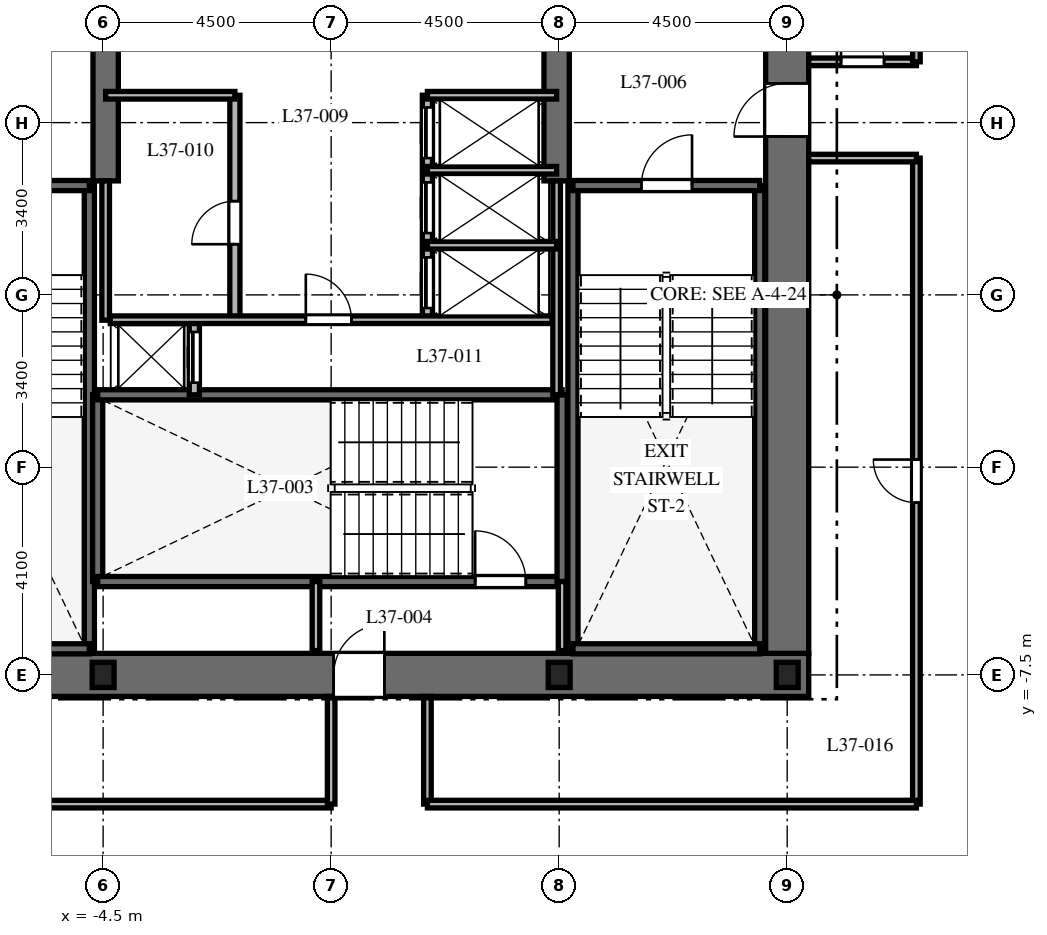
"""IFC4 building model, lengths in metres.
Left out: names, types, materials, properties, quantities, classifications, styles, units other than length and angle.
Written with IfcOpenShell. Run it as: python <this file> out.ifc"""

import sys

from ifc_helpers import new_model, si_unit, direction, frame, frame_2d, origin, origin_2d, place, context, subcontext, project, spatial, rectangle, i_section, extrude, element, fill, save


model = new_model("IFC4")
c1 = context("Model", 3, precision=1e-05, world=origin(), true_north=direction((0.0, 1.0)))
c2 = subcontext(c1, "Body", "Model", "MODEL_VIEW")
j1 = project(units=[si_unit("LENGTHUNIT", "METRE"), si_unit("PLANEANGLEUNIT", "RADIAN")], contexts=[c1])
p1 = place(None, origin())
s1 = spatial("IfcSite", under=j1, at=p1, CompositionType="ELEMENT")
p2 = place(p1, origin())
s2 = spatial("IfcBuilding", under=s1, at=p2, CompositionType="ELEMENT")
p3 = place(p2, frame((0.0, 0.0, 151.7)))
s3 = spatial("IfcBuildingStorey", under=s2, at=p3, CompositionType="ELEMENT", Elevation=151.7)
p4 = place(p3, frame((-9.425, -7.5, 0.0), z_axis=(0.0, 0.0, 1.0), x_axis=(1.0, 0.0, 0.0)))
e1 = element("IfcWall", 1, at=p4, inside=s3, PredefinedType="SHEAR", context=c2, shape_type="SweptSolid", body=[
    extrude(rectangle(XDim=18.85, YDim=0.85, at=frame_2d((9.425, 0.0))), origin(), (0.0, 0.0, 1.0), 3.7),
])
p5 = place(p4, frame((9.475, 0.0, 0.0)))
e2 = element("IfcOpeningElement", 2, at=p5, cuts=e1, PredefinedType="OPENING", context=c2, shape_type="SweptSolid", body=[
    extrude(rectangle(XDim=1.0, YDim=2.15, at=frame_2d((0.5, 1.075))), frame((0.0, 0.435, 0.0), z_axis=(0.0, -1.0, 0.0), x_axis=(1.0, 0.0, 0.0)), (0.0, 0.0, 1.0), 0.87),
])
p6 = place(p3, frame((9.0, -7.075, 0.0), z_axis=(0.0, 0.0, 1.0), x_axis=(0.0, 1.0, 0.0)))
e3 = element("IfcWall", 3, at=p6, inside=s3, PredefinedType="SHEAR", context=c2, shape_type="SweptSolid", body=[
    extrude(rectangle(XDim=14.15, YDim=0.85, at=frame_2d((7.075, 0.0))), origin(), (0.0, 0.0, 1.0), 3.7),
])
p7 = place(p6, frame((10.2, 0.0, 0.0)))
e4 = element("IfcOpeningElement", 4, at=p7, cuts=e3, PredefinedType="OPENING", context=c2, shape_type="SweptSolid", body=[
    extrude(rectangle(XDim=1.05, YDim=2.15, at=frame_2d((0.525, 1.075))), frame((0.0, 0.435, 0.0), z_axis=(0.0, -1.0, 0.0), x_axis=(1.0, 0.0, 0.0)), (0.0, 0.0, 1.0), 0.87),
])
for number, where, z_axis, x_axis in (
    (5, (-4.45, 2.25, 0.0), (0.0, 0.0, 1.0), (0.0, 1.0, 0.0)),
    (6, (4.45, 2.25, 0.0), (0.0, 0.0, 1.0), (0.0, 1.0, 0.0)),
):
    element("IfcWall", number, at=place(p3, frame(where, z_axis=z_axis, x_axis=x_axis)), inside=s3, PredefinedType="SHEAR", context=c2, shape_type="SweptSolid", body=[
        extrude(rectangle(XDim=4.825, YDim=0.5, at=frame_2d((2.413, 0.0))), origin(), (0.0, 0.0, 1.0), 3.7),
    ])
p8 = place(p3, frame((-4.772, -6.985, 0.0), z_axis=(0.0, 0.0, 1.0), x_axis=(0.0, 1.0, 0.0)))
e7 = element("IfcWall", 7, at=p8, inside=s3, PredefinedType="SHEAR", context=c2, shape_type="SweptSolid", body=[
    extrude(rectangle(XDim=9.143, YDim=0.2, at=frame_2d((4.572, 0.0))), origin(), (0.0, 0.0, 1.0), 3.7),
])
p9 = place(p3, frame((-8.458, -6.985, 0.0), z_axis=(0.0, 0.0, 1.0), x_axis=(1.0, 0.0, 0.0)))
e8 = element("IfcWall", 8, at=p9, inside=s3, PredefinedType="SHEAR", context=c2, shape_type="SweptSolid", body=[
    extrude(rectangle(XDim=3.686, YDim=0.2, at=frame_2d((1.843, 0.0))), origin(), (0.0, 0.0, 1.0), 3.7),
])
p10 = place(p3, frame((-8.458, 2.158, 0.0), z_axis=(0.0, 0.0, 1.0), x_axis=(1.0, 0.0, 0.0)))
e9 = element("IfcWall", 9, at=p10, inside=s3, PredefinedType="SHEAR", context=c2, shape_type="SweptSolid", body=[
    extrude(rectangle(XDim=3.686, YDim=0.2, at=frame_2d((1.843, 0.0))), origin(), (0.0, 0.0, 1.0), 3.7),
])
p11 = place(p10, frame((1.3, 0.0, 0.0)))
e10 = element("IfcOpeningElement", 10, at=p11, cuts=e9, PredefinedType="OPENING", context=c2, shape_type="SweptSolid", body=[
    extrude(rectangle(XDim=1.0, YDim=2.15, at=frame_2d((0.5, 1.075))), frame((0.0, 0.11, 0.0), z_axis=(0.0, -1.0, 0.0), x_axis=(1.0, 0.0, 0.0)), (0.0, 0.0, 1.0), 0.22),
])
for number, where, z_axis, x_axis in (
    (11, (4.772, -6.985, 0.0), (0.0, 0.0, 1.0), (0.0, 1.0, 0.0)),
    (12, (8.458, -6.985, 0.0), (0.0, 0.0, 1.0), (0.0, 1.0, 0.0)),
):
    element("IfcWall", number, at=place(p3, frame(where, z_axis=z_axis, x_axis=x_axis)), inside=s3, PredefinedType="SHEAR", context=c2, shape_type="SweptSolid", body=[
        extrude(rectangle(XDim=9.143, YDim=0.2, at=frame_2d((4.572, 0.0))), origin(), (0.0, 0.0, 1.0), 3.7),
    ])
p12 = place(p3, frame((4.772, -6.985, 0.0), z_axis=(0.0, 0.0, 1.0), x_axis=(1.0, 0.0, 0.0)))
e13 = element("IfcWall", 13, at=p12, inside=s3, PredefinedType="SHEAR", context=c2, shape_type="SweptSolid", body=[
    extrude(rectangle(XDim=3.686, YDim=0.2, at=frame_2d((1.843, 0.0))), origin(), (0.0, 0.0, 1.0), 3.7),
])
p13 = place(p3, frame((4.772, 2.158, 0.0), z_axis=(0.0, 0.0, 1.0), x_axis=(1.0, 0.0, 0.0)))
e14 = element("IfcWall", 14, at=p13, inside=s3, PredefinedType="SHEAR", context=c2, shape_type="SweptSolid", body=[
    extrude(rectangle(XDim=3.686, YDim=0.2, at=frame_2d((1.843, 0.0))), origin(), (0.0, 0.0, 1.0), 3.7),
])
p14 = place(p13, frame((1.35, 0.0, 0.0)))
e15 = element("IfcOpeningElement", 15, at=p14, cuts=e14, PredefinedType="OPENING", context=c2, shape_type="SweptSolid", body=[
    extrude(rectangle(XDim=1.0, YDim=2.15, at=frame_2d((0.5, 1.075))), frame((0.0, 0.11, 0.0), z_axis=(0.0, -1.0, 0.0), x_axis=(1.0, 0.0, 0.0)), (0.0, 0.0, 1.0), 0.22),
])
p15 = place(p3, frame((-4.608, -5.658, 0.0), z_axis=(0.0, 0.0, 1.0), x_axis=(0.0, 1.0, 0.0)))
e16 = element("IfcWall", 16, at=p15, inside=s3, PredefinedType="SHEAR", context=c2, shape_type="SweptSolid", body=[
    extrude(rectangle(XDim=3.686, YDim=0.2, at=frame_2d((1.843, 0.0))), origin(), (0.0, 0.0, 1.0), 3.7),
])
p16 = place(p3, frame((-4.608, -5.658, 0.0), z_axis=(0.0, 0.0, 1.0), x_axis=(1.0, 0.0, 0.0)))
e17 = element("IfcWall", 17, at=p16, inside=s3, PredefinedType="SHEAR", context=c2, shape_type="SweptSolid", body=[
    extrude(rectangle(XDim=9.166, YDim=0.2, at=frame_2d((4.583, 0.0))), origin(), (0.0, 0.0, 1.0), 3.7),
])
p17 = place(p16, frame((7.45, 0.0, 0.0)))
e18 = element("IfcOpeningElement", 18, at=p17, cuts=e17, PredefinedType="OPENING", context=c2, shape_type="SweptSolid", body=[
    extrude(rectangle(XDim=1.0, YDim=2.15, at=frame_2d((0.5, 1.075))), frame((0.0, 0.11, 0.0), z_axis=(0.0, -1.0, 0.0), x_axis=(1.0, 0.0, 0.0)), (0.0, 0.0, 1.0), 0.22),
])
p18 = place(p3, frame((-4.608, -1.972, 0.0), z_axis=(0.0, 0.0, 1.0), x_axis=(1.0, 0.0, 0.0)))
e19 = element("IfcWall", 19, at=p18, inside=s3, PredefinedType="SHEAR", context=c2, shape_type="SweptSolid", body=[
    extrude(rectangle(XDim=9.166, YDim=0.2, at=frame_2d((4.583, 0.0))), origin(), (0.0, 0.0, 1.0), 3.7),
])
p19 = place(p3, frame((4.558, -5.658, 0.0), z_axis=(0.0, 0.0, 1.0), x_axis=(0.0, 1.0, 0.0)))
e20 = element("IfcWall", 20, at=p19, inside=s3, PredefinedType="SHEAR", context=c2, shape_type="SweptSolid", body=[
    extrude(rectangle(XDim=3.686, YDim=0.2, at=frame_2d((1.843, 0.0))), origin(), (0.0, 0.0, 1.0), 3.7),
])
for number, where, z_axis, x_axis in (
    (21, (-4.5, -7.5, 0.0), (0.0, 0.0, 1.0), (1.0, 0.0, 0.0)),
    (22, (4.5, -7.5, 0.0), (0.0, 0.0, 1.0), (1.0, 0.0, 0.0)),
    (23, (9.0, -7.5, 0.0), (0.0, 0.0, 1.0), (1.0, 0.0, 0.0)),
):
    element("IfcColumn", number, at=place(p3, frame(where, z_axis=z_axis, x_axis=x_axis)), inside=s3, PredefinedType="COLUMN", context=c2, shape_type="SweptSolid", body=[
        extrude(i_section(OverallWidth=0.432, OverallDepth=0.498, WebThickness=0.056, FlangeThickness=0.089, at=origin_2d()), origin(), (0.0, 0.0, 1.0), 3.7),
    ])
for number, where, z_axis, x_axis in (
    (24, (-0.3, -7.02, 0.0), (0.0, 0.0, 1.0), (0.0, 1.0, 0.0)),
    (25, (4.558, -7.02, 0.0), (0.0, 0.0, 1.0), (0.0, 1.0, 0.0)),
):
    element("IfcWall", number, at=place(p3, frame(where, z_axis=z_axis, x_axis=x_axis)), inside=s3, PredefinedType="PARTITIONING", context=c2, shape_type="SweptSolid", body=[
        extrude(rectangle(XDim=1.362, YDim=0.15, at=frame_2d((0.681, 0.0))), origin(), (0.0, 0.0, 1.0), 3.4),
    ])
p20 = place(p3, frame((-2.7, -1.972, 0.0), z_axis=(0.0, 0.0, 1.0), x_axis=(0.0, 1.0, 0.0)))
e26 = element("IfcWall", 26, at=p20, inside=s3, PredefinedType="PARTITIONING", context=c2, shape_type="SweptSolid", body=[
    extrude(rectangle(XDim=1.472, YDim=0.2, at=frame_2d((0.736, 0.0))), origin(), (0.0, 0.0, 1.0), 3.4),
])
p21 = place(p20, frame((0.24, 0.0, 0.0)))
e27 = element("IfcOpeningElement", 27, at=p21, cuts=e26, PredefinedType="OPENING", context=c2, shape_type="SweptSolid", body=[
    extrude(rectangle(XDim=1.0, YDim=2.2, at=frame_2d((0.5, 1.1))), frame((0.0, 0.11, 0.0), z_axis=(0.0, -1.0, 0.0), x_axis=(1.0, 0.0, 0.0)), (0.0, 0.0, 1.0), 0.22),
])
p22 = place(p3, frame((-4.45, -0.5, 0.0), z_axis=(0.0, 0.0, 1.0), x_axis=(0.0, 1.0, 0.0)))
e28 = element("IfcWall", 28, at=p22, inside=s3, PredefinedType="PARTITIONING", context=c2, shape_type="SweptSolid", body=[
    extrude(rectangle(XDim=2.75, YDim=0.15, at=frame_2d((1.375, 0.0))), origin(), (0.0, 0.0, 1.0), 3.4),
])
p23 = place(p3, frame((4.45, -1.972, 0.0), z_axis=(0.0, 0.0, 1.0), x_axis=(0.0, 1.0, 0.0)))
e29 = element("IfcWall", 29, at=p23, inside=s3, PredefinedType="PARTITIONING", context=c2, shape_type="SweptSolid", body=[
    extrude(rectangle(XDim=4.222, YDim=0.15, at=frame_2d((2.111, 0.0))), origin(), (0.0, 0.0, 1.0), 3.4),
])
p24 = place(p3, frame((-1.9, -0.5, 0.0), z_axis=(0.0, 0.0, 1.0), x_axis=(0.0, 1.0, 0.0)))
e30 = element("IfcWall", 30, at=p24, inside=s3, PredefinedType="PARTITIONING", context=c2, shape_type="SweptSolid", body=[
    extrude(rectangle(XDim=4.44, YDim=0.2, at=frame_2d((2.22, 0.0))), origin(), (0.0, 0.0, 1.0), 3.4),
])
p25 = place(p24, frame((1.5, 0.0, 0.0)))
e31 = element("IfcOpeningElement", 31, at=p25, cuts=e30, PredefinedType="OPENING", context=c2, shape_type="SweptSolid", body=[
    extrude(rectangle(XDim=0.85, YDim=2.03, at=frame_2d((0.425, 1.015))), frame((0.0, 0.11, 0.0), z_axis=(0.0, -1.0, 0.0), x_axis=(1.0, 0.0, 0.0)), (0.0, 0.0, 1.0), 0.22),
])
p26 = place(p3, frame((-4.45, 3.94, 0.0), z_axis=(0.0, 0.0, 1.0), x_axis=(1.0, 0.0, 0.0)))
e32 = element("IfcWall", 32, at=p26, inside=s3, PredefinedType="PARTITIONING", context=c2, shape_type="SweptSolid", body=[
    extrude(rectangle(XDim=2.55, YDim=0.15, at=frame_2d((1.275, 0.0))), origin(), (0.0, 0.0, 1.0), 3.4),
])
p27 = place(p3, frame((1.9, -0.5, 0.0), z_axis=(0.0, 0.0, 1.0), x_axis=(0.0, 1.0, 0.0)))
e33 = element("IfcWall", 33, at=p27, inside=s3, PredefinedType="PARTITIONING", context=c2, shape_type="SweptSolid", body=[
    extrude(rectangle(XDim=4.44, YDim=0.2, at=frame_2d((2.22, 0.0))), origin(), (0.0, 0.0, 1.0), 3.4),
])
p28 = place(p27, frame((0.24, 0.0, 0.0)))
e34 = element("IfcOpeningElement", 34, at=p28, cuts=e33, PredefinedType="OPENING", context=c2, shape_type="SweptSolid", body=[
    extrude(rectangle(XDim=1.0, YDim=2.2, at=frame_2d((0.5, 1.1))), frame((0.0, 0.11, 0.0), z_axis=(0.0, -1.0, 0.0), x_axis=(1.0, 0.0, 0.0)), (0.0, 0.0, 1.0), 0.22),
])
p29 = place(p27, frame((1.72, 0.0, 0.0)))
e35 = element("IfcOpeningElement", 35, at=p29, cuts=e33, PredefinedType="OPENING", context=c2, shape_type="SweptSolid", body=[
    extrude(rectangle(XDim=1.0, YDim=2.2, at=frame_2d((0.5, 1.1))), frame((0.0, 0.11, 0.0), z_axis=(0.0, -1.0, 0.0), x_axis=(1.0, 0.0, 0.0)), (0.0, 0.0, 1.0), 0.22),
])
p30 = place(p27, frame((3.2, 0.0, 0.0)))
e36 = element("IfcOpeningElement", 36, at=p30, cuts=e33, PredefinedType="OPENING", context=c2, shape_type="SweptSolid", body=[
    extrude(rectangle(XDim=1.0, YDim=2.2, at=frame_2d((0.5, 1.1))), frame((0.0, 0.11, 0.0), z_axis=(0.0, -1.0, 0.0), x_axis=(1.0, 0.0, 0.0)), (0.0, 0.0, 1.0), 0.22),
])
for number, where, z_axis, x_axis in (
    (37, (1.9, 3.94, 0.0), (0.0, 0.0, 1.0), (1.0, 0.0, 0.0)),
    (38, (1.9, 0.98, 0.0), (0.0, 0.0, 1.0), (1.0, 0.0, 0.0)),
    (39, (1.9, 2.46, 0.0), (0.0, 0.0, 1.0), (1.0, 0.0, 0.0)),
):
    element("IfcWall", number, at=place(p3, frame(where, z_axis=z_axis, x_axis=x_axis)), inside=s3, PredefinedType="PARTITIONING", context=c2, shape_type="SweptSolid", body=[
        extrude(rectangle(XDim=2.55, YDim=0.15, at=frame_2d((1.275, 0.0))), origin(), (0.0, 0.0, 1.0), 3.4),
    ])
p31 = place(p3, frame((-4.36, -0.49, 0.0), z_axis=(0.0, 0.0, 1.0), x_axis=(1.0, 0.0, 0.0)))
e40 = element("IfcWall", 40, at=p31, inside=s3, PredefinedType="PARTITIONING", context=c2, shape_type="SweptSolid", body=[
    extrude(rectangle(XDim=8.72, YDim=0.15, at=frame_2d((4.36, 0.0))), origin(), (0.0, 0.0, 1.0), 3.4),
])
p32 = place(p31, frame((3.86, 0.0, 0.0)))
e41 = element("IfcOpeningElement", 41, at=p32, cuts=e40, PredefinedType="OPENING", context=c2, shape_type="SweptSolid", body=[
    extrude(rectangle(XDim=0.9, YDim=2.03, at=frame_2d((0.45, 1.015))), frame((0.0, 0.085, 0.0), z_axis=(0.0, -1.0, 0.0), x_axis=(1.0, 0.0, 0.0)), (0.0, 0.0, 1.0), 0.17),
])
p33 = place(p3, frame((11.55, -10.05, 0.0), z_axis=(0.0, 0.0, 1.0), x_axis=(0.0, 1.0, 0.0)))
e42 = element("IfcWall", 42, at=p33, inside=s3, PredefinedType="PARTITIONING", context=c2, shape_type="SweptSolid", body=[
    extrude(rectangle(XDim=12.75, YDim=0.15, at=frame_2d((6.375, 0.0))), origin(), (0.0, 0.0, 1.0), 2.84),
])
p34 = place(p33, frame((5.95, 0.0, 0.0)))
e43 = element("IfcOpeningElement", 43, at=p34, cuts=e42, PredefinedType="OPENING", context=c2, shape_type="SweptSolid", body=[
    extrude(rectangle(XDim=0.85, YDim=2.03, at=frame_2d((0.425, 1.015))), frame((0.0, 0.085, 0.0), z_axis=(0.0, -1.0, 0.0), x_axis=(1.0, 0.0, 0.0)), (0.0, 0.0, 1.0), 0.17),
])
p35 = place(p3, frame((11.55, 2.7, 0.0), z_axis=(0.0, 0.0, 1.0), x_axis=(-1.0, 0.0, 0.0)))
e44 = element("IfcWall", 44, at=p35, inside=s3, PredefinedType="PARTITIONING", context=c2, shape_type="SweptSolid", body=[
    extrude(rectangle(XDim=2.125, YDim=0.15, at=frame_2d((1.062, 0.0))), origin(), (0.0, 0.0, 1.0), 3.4),
])
p36 = place(p3, frame((9.425, 4.6, 0.0), z_axis=(0.0, 0.0, 1.0), x_axis=(1.0, 0.0, 0.0)))
e45 = element("IfcWall", 45, at=p36, inside=s3, PredefinedType="PARTITIONING", context=c2, shape_type="SweptSolid", body=[
    extrude(rectangle(XDim=2.125, YDim=0.15, at=frame_2d((1.062, 0.0))), origin(), (0.0, 0.0, 1.0), 3.4),
])
p37 = place(p36, frame((0.637, 0.0, 0.0)))
e46 = element("IfcOpeningElement", 46, at=p37, cuts=e45, PredefinedType="OPENING", context=c2, shape_type="SweptSolid", body=[
    extrude(rectangle(XDim=0.85, YDim=2.03, at=frame_2d((0.425, 1.015))), frame((0.0, 0.085, 0.0), z_axis=(0.0, -1.0, 0.0), x_axis=(1.0, 0.0, 0.0)), (0.0, 0.0, 1.0), 0.17),
])
p38 = place(p3, frame((11.55, 4.6, 0.0), z_axis=(0.0, 0.0, 1.0), x_axis=(0.0, 1.0, 0.0)))
e47 = element("IfcWall", 47, at=p38, inside=s3, PredefinedType="PARTITIONING", context=c2, shape_type="SweptSolid", body=[
    extrude(rectangle(XDim=5.45, YDim=0.15, at=frame_2d((2.725, 0.0))), origin(), (0.0, 0.0, 1.0), 2.84),
])
p39 = place(p3, frame((-11.55, -10.05, 0.0), z_axis=(0.0, 0.0, 1.0), x_axis=(1.0, 0.0, 0.0)))
e48 = element("IfcWall", 48, at=p39, inside=s3, PredefinedType="PARTITIONING", context=c2, shape_type="SweptSolid", body=[
    extrude(rectangle(XDim=11.55, YDim=0.15, at=frame_2d((5.775, 0.0))), origin(), (0.0, 0.0, 1.0), 2.84),
])
for number, where, z_axis, x_axis in (
    (49, (0.0, -10.05, 0.0), (0.0, 0.0, 1.0), (0.0, 1.0, 0.0)),
    (50, (1.9, -7.925, 0.0), (0.0, 0.0, 1.0), (0.0, -1.0, 0.0)),
):
    element("IfcWall", number, at=place(p3, frame(where, z_axis=z_axis, x_axis=x_axis)), inside=s3, PredefinedType="PARTITIONING", context=c2, shape_type="SweptSolid", body=[
        extrude(rectangle(XDim=2.125, YDim=0.15, at=frame_2d((1.062, 0.0))), origin(), (0.0, 0.0, 1.0), 3.4),
    ])
p40 = place(p3, frame((1.9, -10.05, 0.0), z_axis=(0.0, 0.0, 1.0), x_axis=(1.0, 0.0, 0.0)))
e51 = element("IfcWall", 51, at=p40, inside=s3, PredefinedType="PARTITIONING", context=c2, shape_type="SweptSolid", body=[
    extrude(rectangle(XDim=9.65, YDim=0.15, at=frame_2d((4.825, 0.0))), origin(), (0.0, 0.0, 1.0), 2.84),
])
p41 = place(p14, origin())
e52 = element("IfcDoor", 52, at=p41, inside=s3, OperationType="SINGLE_SWING_RIGHT", PredefinedType="DOOR", context=c2, shape_type="SweptSolid", body=[
    extrude(rectangle(XDim=1.0, YDim=2.15, at=frame_2d((0.5, 1.075))), frame((0.0, 0.025, 0.0), z_axis=(0.0, -1.0, 0.0), x_axis=(1.0, 0.0, 0.0)), (0.0, 0.0, 1.0), 0.05),
])
fill(e15, e52)
p42 = place(p17, origin())
e53 = element("IfcDoor", 53, at=p42, inside=s3, OperationType="SINGLE_SWING_LEFT", PredefinedType="DOOR", context=c2, shape_type="SweptSolid", body=[
    extrude(rectangle(XDim=1.0, YDim=2.15, at=frame_2d((0.5, 1.075))), frame((0.0, 0.025, 0.0), z_axis=(0.0, -1.0, 0.0), x_axis=(1.0, 0.0, 0.0)), (0.0, 0.0, 1.0), 0.05),
])
fill(e18, e53)
p43 = place(p5, origin())
e54 = element("IfcDoor", 54, at=p43, inside=s3, OperationType="SINGLE_SWING_RIGHT", PredefinedType="DOOR", context=c2, shape_type="SweptSolid", body=[
    extrude(rectangle(XDim=1.0, YDim=2.15, at=frame_2d((0.5, 1.075))), frame((0.0, 0.025, 0.0), z_axis=(0.0, -1.0, 0.0), x_axis=(1.0, 0.0, 0.0)), (0.0, 0.0, 1.0), 0.05),
])
fill(e2, e54)
p44 = place(p7, origin())
e55 = element("IfcDoor", 55, at=p44, inside=s3, OperationType="SINGLE_SWING_LEFT", PredefinedType="DOOR", context=c2, shape_type="SweptSolid", body=[
    extrude(rectangle(XDim=1.05, YDim=2.15, at=frame_2d((0.525, 1.075))), frame((0.0, 0.025, 0.0), z_axis=(0.0, -1.0, 0.0), x_axis=(1.0, 0.0, 0.0)), (0.0, 0.0, 1.0), 0.05),
])
fill(e4, e55)
p45 = place(p21, origin())
e56 = element("IfcDoor", 56, at=p45, inside=s3, OperationType="SLIDING_TO_LEFT", PredefinedType="DOOR", context=c2, shape_type="SweptSolid", body=[
    extrude(rectangle(XDim=1.0, YDim=2.2, at=frame_2d((0.5, 1.1))), frame((0.0, 0.025, 0.0), z_axis=(0.0, -1.0, 0.0), x_axis=(1.0, 0.0, 0.0)), (0.0, 0.0, 1.0), 0.05),
])
fill(e27, e56)
p46 = place(p25, origin())
e57 = element("IfcDoor", 57, at=p46, inside=s3, OperationType="SINGLE_SWING_LEFT", PredefinedType="DOOR", context=c2, shape_type="SweptSolid", body=[
    extrude(rectangle(XDim=0.85, YDim=2.03, at=frame_2d((0.425, 1.015))), frame((0.0, 0.025, 0.0), z_axis=(0.0, -1.0, 0.0), x_axis=(1.0, 0.0, 0.0)), (0.0, 0.0, 1.0), 0.05),
])
fill(e31, e57)
p47 = place(p28, origin())
e58 = element("IfcDoor", 58, at=p47, inside=s3, OperationType="SLIDING_TO_RIGHT", PredefinedType="DOOR", context=c2, shape_type="SweptSolid", body=[
    extrude(rectangle(XDim=1.0, YDim=2.2, at=frame_2d((0.5, 1.1))), frame((0.0, 0.025, 0.0), z_axis=(0.0, -1.0, 0.0), x_axis=(1.0, 0.0, 0.0)), (0.0, 0.0, 1.0), 0.05),
])
fill(e34, e58)
p48 = place(p29, origin())
e59 = element("IfcDoor", 59, at=p48, inside=s3, OperationType="SLIDING_TO_RIGHT", PredefinedType="DOOR", context=c2, shape_type="SweptSolid", body=[
    extrude(rectangle(XDim=1.0, YDim=2.2, at=frame_2d((0.5, 1.1))), frame((0.0, 0.025, 0.0), z_axis=(0.0, -1.0, 0.0), x_axis=(1.0, 0.0, 0.0)), (0.0, 0.0, 1.0), 0.05),
])
fill(e35, e59)
p49 = place(p30, origin())
e60 = element("IfcDoor", 60, at=p49, inside=s3, OperationType="SLIDING_TO_RIGHT", PredefinedType="DOOR", context=c2, shape_type="SweptSolid", body=[
    extrude(rectangle(XDim=1.0, YDim=2.2, at=frame_2d((0.5, 1.1))), frame((0.0, 0.025, 0.0), z_axis=(0.0, -1.0, 0.0), x_axis=(1.0, 0.0, 0.0)), (0.0, 0.0, 1.0), 0.05),
])
fill(e36, e60)
p50 = place(p32, origin())
e61 = element("IfcDoor", 61, at=p50, inside=s3, OperationType="SINGLE_SWING_LEFT", PredefinedType="DOOR", context=c2, shape_type="SweptSolid", body=[
    extrude(rectangle(XDim=0.9, YDim=2.03, at=frame_2d((0.45, 1.015))), frame((0.0, 0.025, 0.0), z_axis=(0.0, -1.0, 0.0), x_axis=(1.0, 0.0, 0.0)), (0.0, 0.0, 1.0), 0.05),
])
fill(e41, e61)
p51 = place(p37, origin())
e62 = element("IfcDoor", 62, at=p51, inside=s3, OperationType="SINGLE_SWING_LEFT", PredefinedType="DOOR", context=c2, shape_type="SweptSolid", body=[
    extrude(rectangle(XDim=0.85, YDim=2.03, at=frame_2d((0.425, 1.015))), frame((0.0, 0.025, 0.0), z_axis=(0.0, -1.0, 0.0), x_axis=(1.0, 0.0, 0.0)), (0.0, 0.0, 1.0), 0.05),
])
fill(e46, e62)
p52 = place(p34, origin())
e63 = element("IfcDoor", 63, at=p52, inside=s3, OperationType="SINGLE_SWING_RIGHT", PredefinedType="DOOR", context=c2, shape_type="SweptSolid", body=[
    extrude(rectangle(XDim=0.85, YDim=2.03, at=frame_2d((0.425, 1.015))), frame((0.0, 0.025, 0.0), z_axis=(0.0, -1.0, 0.0), x_axis=(1.0, 0.0, 0.0)), (0.0, 0.0, 1.0), 0.05),
])
fill(e43, e63)
save(model, sys.argv[1])
